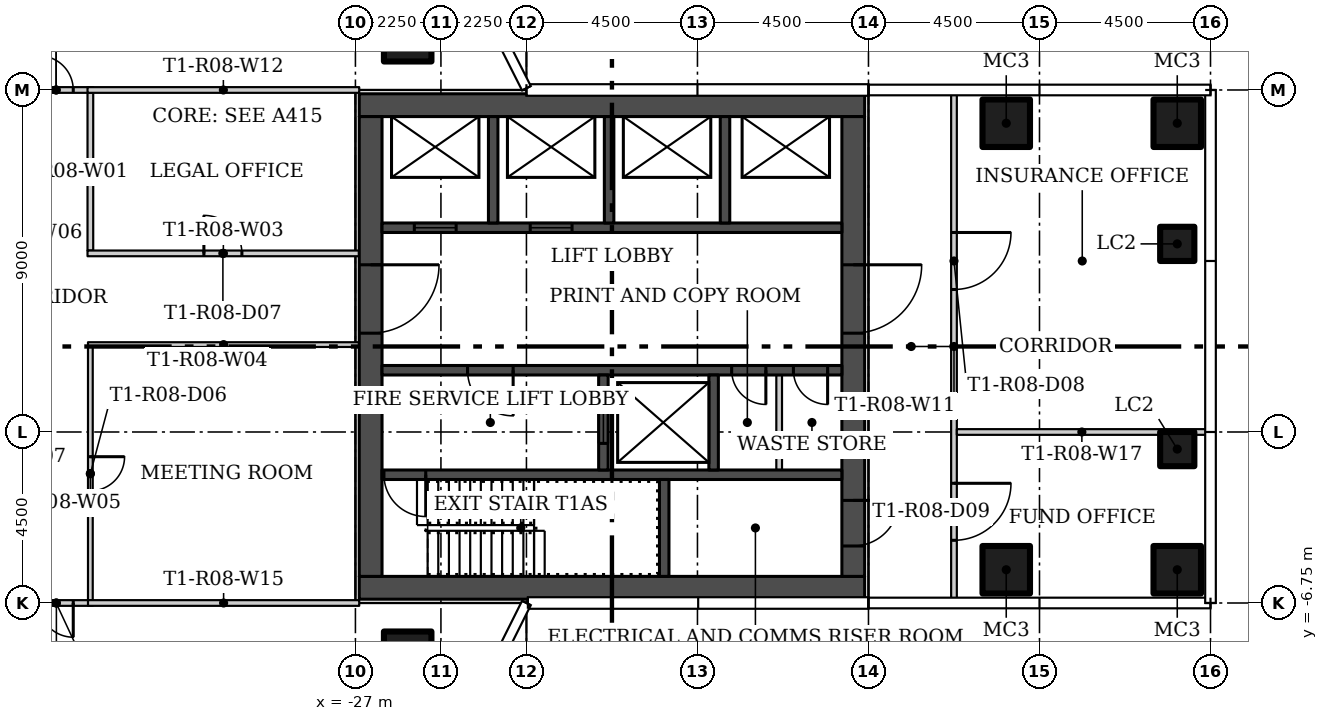
"""IFC4 building model, lengths in metres.
Left out: names, types, materials, properties, quantities, classifications, styles, units other than length and angle.
Written with IfcOpenShell. Run it as: python <this file> out.ifc"""

import sys

from ifc_helpers import new_model, si_unit, direction, frame, frame_2d, origin, origin_2d, place, context, subcontext, project, spatial, rectangle, hollow_rectangle, extrude, element, fill, save


model = new_model("IFC4")
c1 = context("Model", 3, precision=1e-05, world=origin(), true_north=direction((0.0, 1.0)))
c2 = subcontext(c1, "Body", "Model", "MODEL_VIEW")
j1 = project(units=[si_unit("LENGTHUNIT", "METRE"), si_unit("PLANEANGLEUNIT", "RADIAN")], contexts=[c1])
p1 = place(None, origin())
s1 = spatial("IfcSite", under=j1, at=p1, CompositionType="ELEMENT")
p2 = place(p1, origin())
s2 = spatial("IfcBuilding", under=s1, at=p2, CompositionType="ELEMENT")
p3 = place(p2, frame((0.0, 0.0, 85.8)))
s3 = spatial("IfcBuildingStorey", under=s2, at=p3, CompositionType="ELEMENT", Elevation=85.8)
for number, where in (
    (1, (-25.625, 8.125, 0.0)),
    (2, (-25.625, -8.125, 0.0)),
    (3, (-9.875, -5.875, 0.0)),
    (4, (-5.375, -5.875, 0.0)),
    (5, (-9.875, 5.875, 0.0)),
    (6, (-5.375, 5.875, 0.0)),
):
    element("IfcColumn", number, at=place(p3, frame(where)), inside=s3, PredefinedType="COLUMN", context=c2, shape_type="SweptSolid", body=[
        extrude(hollow_rectangle(XDim=1.25, YDim=1.25, WallThickness=0.05, at=origin_2d()), origin(), (0.0, 0.0, 1.0), 3.55),
    ])
for number, where in (
    (7, (-5.375, -2.7, 0.0)),
    (8, (-5.375, 2.7, 0.0)),
):
    element("IfcColumn", number, at=place(p3, frame(where)), inside=s3, PredefinedType="COLUMN", context=c2, shape_type="SweptSolid", body=[
        extrude(hollow_rectangle(XDim=0.9, YDim=0.9, WallThickness=0.036, at=origin_2d()), origin(), (0.0, 0.0, 1.0), 3.55),
    ])
p4 = place(p3, frame((-33.975, 6.675, 0.0), z_axis=(0.0, 0.0, 1.0), x_axis=(0.0, -1.0, 0.0)))
e9 = element("IfcWall", 9, at=p4, inside=s3, PredefinedType="PARTITIONING", context=c2, shape_type="SweptSolid", body=[
    extrude(rectangle(XDim=4.15, YDim=0.15, at=frame_2d((2.075, 0.0))), origin(), (0.0, 0.0, 1.0), 3.55),
])
p5 = place(p3, frame((-34.05, 2.45, 0.0)))
e10 = element("IfcWall", 10, at=p5, inside=s3, PredefinedType="PARTITIONING", context=c2, shape_type="SweptSolid", body=[
    extrude(rectangle(XDim=7.15, YDim=0.15, at=frame_2d((3.575, 0.0))), origin(), (0.0, 0.0, 1.0), 3.55),
])
p6 = place(p5, frame((3.062, 0.0, 0.0)))
e11 = element("IfcOpeningElement", 11, at=p6, cuts=e10, PredefinedType="OPENING", context=c2, shape_type="SweptSolid", body=[
    extrude(rectangle(XDim=1.0, YDim=2.4, at=frame_2d((0.5, 1.2))), frame((0.0, 0.085, 0.0), z_axis=(0.0, -1.0, 0.0), x_axis=(1.0, 0.0, 0.0)), (0.0, 0.0, 1.0), 0.17),
])
p7 = place(p3, frame((-26.9, 0.05, 0.0), z_axis=(0.0, 0.0, 1.0), x_axis=(-1.0, 0.0, 0.0)))
e12 = element("IfcWall", 12, at=p7, inside=s3, PredefinedType="PARTITIONING", context=c2, shape_type="SweptSolid", body=[
    extrude(rectangle(XDim=7.137, YDim=0.125, at=frame_2d((3.569, 0.0))), origin(), (0.0, 0.0, 1.0), 3.55),
])
p8 = place(p3, frame((-33.975, -0.013, 0.0), z_axis=(0.0, 0.0, 1.0), x_axis=(0.0, -1.0, 0.0)))
e13 = element("IfcWall", 13, at=p8, inside=s3, PredefinedType="PARTITIONING", context=c2, shape_type="SweptSolid", body=[
    extrude(rectangle(XDim=6.662, YDim=0.125, at=frame_2d((3.331, 0.0))), origin(), (0.0, 0.0, 1.0), 3.55),
])
p9 = place(p8, frame((2.887, 0.0, 0.0)))
e14 = element("IfcOpeningElement", 14, at=p9, cuts=e13, PredefinedType="OPENING", context=c2, shape_type="SweptSolid", body=[
    extrude(rectangle(XDim=0.9, YDim=2.1, at=frame_2d((0.45, 1.05))), frame((0.0, 0.073, 0.0), z_axis=(0.0, -1.0, 0.0), x_axis=(1.0, 0.0, 0.0)), (0.0, 0.0, 1.0), 0.145),
])
p10 = place(p3, frame((-35.85, 6.75, 0.0)))
e15 = element("IfcWall", 15, at=p10, inside=s3, PredefinedType="PARTITIONING", context=c2, shape_type="SweptSolid", body=[
    extrude(rectangle(XDim=1.951, YDim=0.15, at=frame_2d((0.975, 0.0))), origin(), (0.0, 0.0, 1.0), 3.55),
])
p11 = place(p10, frame((0.525, 0.0, 0.0)))
e16 = element("IfcOpeningElement", 16, at=p11, cuts=e15, PredefinedType="OPENING", context=c2, shape_type="SweptSolid", body=[
    extrude(rectangle(XDim=0.9, YDim=2.1, at=frame_2d((0.45, 1.05))), frame((0.0, 0.085, 0.0), z_axis=(0.0, -1.0, 0.0), x_axis=(1.0, 0.0, 0.0)), (0.0, 0.0, 1.0), 0.17),
])
p12 = place(p3, frame((-33.912, -6.75, 0.0), z_axis=(0.0, 0.0, 1.0), x_axis=(-1.0, 0.0, 0.0)))
e17 = element("IfcWall", 17, at=p12, inside=s3, PredefinedType="PARTITIONING", context=c2, shape_type="SweptSolid", body=[
    extrude(rectangle(XDim=1.913, YDim=0.15, at=frame_2d((0.957, 0.0))), origin(), (0.0, 0.0, 1.0), 3.55),
])
p13 = place(p12, frame((0.513, 0.0, 0.0)))
e18 = element("IfcOpeningElement", 18, at=p13, cuts=e17, PredefinedType="OPENING", context=c2, shape_type="SweptSolid", body=[
    extrude(rectangle(XDim=0.9, YDim=2.1, at=frame_2d((0.45, 1.05))), frame((0.0, 0.085, 0.0), z_axis=(0.0, -1.0, 0.0), x_axis=(1.0, 0.0, 0.0)), (0.0, 0.0, 1.0), 0.17),
])
p14 = place(p3, frame((-11.25, 6.655, 0.0), z_axis=(0.0, 0.0, 1.0), x_axis=(0.0, -1.0, 0.0)))
e19 = element("IfcWall", 19, at=p14, inside=s3, PredefinedType="PARTITIONING", context=c2, shape_type="SweptSolid", body=[
    extrude(rectangle(XDim=13.31, YDim=0.15, at=frame_2d((6.655, 0.0))), origin(), (0.0, 0.0, 1.0), 3.55),
])
p15 = place(p14, frame((3.655, 0.0, 0.0)))
e20 = element("IfcOpeningElement", 20, at=p15, cuts=e19, PredefinedType="OPENING", context=c2, shape_type="SweptSolid", body=[
    extrude(rectangle(XDim=1.5, YDim=2.1, at=frame_2d((0.75, 1.05))), frame((0.0, 0.085, 0.0), z_axis=(0.0, -1.0, 0.0), x_axis=(1.0, 0.0, 0.0)), (0.0, 0.0, 1.0), 0.17),
])
p16 = place(p14, frame((10.255, 0.0, 0.0)))
e21 = element("IfcOpeningElement", 21, at=p16, cuts=e19, PredefinedType="OPENING", context=c2, shape_type="SweptSolid", body=[
    extrude(rectangle(XDim=1.5, YDim=2.1, at=frame_2d((0.75, 1.05))), frame((0.0, 0.085, 0.0), z_axis=(0.0, -1.0, 0.0), x_axis=(1.0, 0.0, 0.0)), (0.0, 0.0, 1.0), 0.17),
])
p17 = place(p3, frame((-26.9, 6.75, 0.0), z_axis=(0.0, 0.0, 1.0), x_axis=(-1.0, 0.0, 0.0)))
e22 = element("IfcWall", 22, at=p17, inside=s3, PredefinedType="PARTITIONING", context=c2, shape_type="SweptSolid", body=[
    extrude(rectangle(XDim=7.15, YDim=0.15, at=frame_2d((3.575, 0.0))), origin(), (0.0, 0.0, 1.0), 3.55),
])
p18 = place(p3, frame((-34.037, -6.75, 0.0)))
e23 = element("IfcWall", 23, at=p18, inside=s3, PredefinedType="PARTITIONING", context=c2, shape_type="SweptSolid", body=[
    extrude(rectangle(XDim=7.137, YDim=0.15, at=frame_2d((3.569, 0.0))), origin(), (0.0, 0.0, 1.0), 3.55),
])
p19 = place(p3, frame((-4.595, -2.25, 0.0), z_axis=(0.0, 0.0, 1.0), x_axis=(-1.0, 0.0, 0.0)))
e24 = element("IfcWall", 24, at=p19, inside=s3, PredefinedType="PARTITIONING", context=c2, shape_type="SweptSolid", body=[
    extrude(rectangle(XDim=6.58, YDim=0.15, at=frame_2d((3.29, 0.0))), origin(), (0.0, 0.0, 1.0), 3.55),
])
for number, where in (
    (25, (-26.9, -6.35, 0.0)),
    (26, (-26.9, 6.35, 0.0)),
):
    element("IfcWall", number, at=place(p3, frame(where)), inside=s3, PredefinedType="SHEAR", context=c2, shape_type="SweptSolid", body=[
        extrude(rectangle(XDim=13.3, YDim=0.6, at=frame_2d((6.65, 0.0))), origin(), (0.0, 0.0, 1.0), 3.55),
    ])
p20 = place(p3, frame((-26.6, 6.05, 0.0), z_axis=(0.0, 0.0, 1.0), x_axis=(0.0, -1.0, 0.0)))
e27 = element("IfcWall", 27, at=p20, inside=s3, PredefinedType="SHEAR", context=c2, shape_type="SweptSolid", body=[
    extrude(rectangle(XDim=12.1, YDim=0.6, at=frame_2d((6.05, 0.0))), origin(), (0.0, 0.0, 1.0), 3.55),
])
p21 = place(p20, frame((3.9, 0.0, 0.0)))
e28 = element("IfcOpeningElement", 28, at=p21, cuts=e27, PredefinedType="OPENING", context=c2, shape_type="SweptSolid", body=[
    extrude(rectangle(XDim=1.8, YDim=2.4, at=frame_2d((0.9, 1.2))), frame((0.0, 0.31, 0.0), z_axis=(0.0, -1.0, 0.0), x_axis=(1.0, 0.0, 0.0)), (0.0, 0.0, 1.0), 0.62),
])
p22 = place(p3, frame((-13.9, 6.05, 0.0), z_axis=(0.0, 0.0, 1.0), x_axis=(0.0, -1.0, 0.0)))
e29 = element("IfcWall", 29, at=p22, inside=s3, PredefinedType="SHEAR", context=c2, shape_type="SweptSolid", body=[
    extrude(rectangle(XDim=12.1, YDim=0.6, at=frame_2d((6.05, 0.0))), origin(), (0.0, 0.0, 1.0), 3.55),
])
p23 = place(p22, frame((10.1, 0.0, 0.0)))
e30 = element("IfcOpeningElement", 30, at=p23, cuts=e29, PredefinedType="OPENING", context=c2, shape_type="SweptSolid", body=[
    extrude(rectangle(XDim=1.2, YDim=2.1, at=frame_2d((0.6, 1.05))), frame((0.0, 0.31, 0.0), z_axis=(0.0, -1.0, 0.0), x_axis=(1.0, 0.0, 0.0)), (0.0, 0.0, 1.0), 0.62),
])
p24 = place(p22, frame((3.9, 0.0, 0.0)))
e31 = element("IfcOpeningElement", 31, at=p24, cuts=e29, PredefinedType="OPENING", context=c2, shape_type="SweptSolid", body=[
    extrude(rectangle(XDim=1.8, YDim=2.4, at=frame_2d((0.9, 1.2))), frame((0.0, 0.31, 0.0), z_axis=(0.0, -1.0, 0.0), x_axis=(1.0, 0.0, 0.0)), (0.0, 0.0, 1.0), 0.62),
])
p25 = place(p3, frame((-14.2, -3.375, 0.0), z_axis=(0.0, 0.0, 1.0), x_axis=(-1.0, 0.0, 0.0)))
e32 = element("IfcWall", 32, at=p25, inside=s3, PredefinedType="SHEAR", context=c2, shape_type="SweptSolid", body=[
    extrude(rectangle(XDim=12.1, YDim=0.25, at=frame_2d((6.05, 0.0))), origin(), (0.0, 0.0, 1.0), 3.55),
])
p26 = place(p25, frame((10.95, 0.0, 0.0)))
e33 = element("IfcOpeningElement", 33, at=p26, cuts=e32, PredefinedType="OPENING", context=c2, shape_type="SweptSolid", body=[
    extrude(rectangle(XDim=1.1, YDim=2.1, at=frame_2d((0.55, 1.05))), frame((0.0, 0.135, 0.0), z_axis=(0.0, -1.0, 0.0), x_axis=(1.0, 0.0, 0.0)), (0.0, 0.0, 1.0), 0.27),
])
p27 = place(p3, frame((-18.875, -6.05, 0.0), z_axis=(0.0, 0.0, 1.0), x_axis=(0.0, 1.0, 0.0)))
e34 = element("IfcWall", 34, at=p27, inside=s3, PredefinedType="SHEAR", context=c2, shape_type="SweptSolid", body=[
    extrude(rectangle(XDim=2.55, YDim=0.25, at=frame_2d((1.275, 0.0))), origin(), (0.0, 0.0, 1.0), 3.55),
])
p28 = place(p3, frame((-14.2, -0.625, 0.0), z_axis=(0.0, 0.0, 1.0), x_axis=(-1.0, 0.0, 0.0)))
e35 = element("IfcWall", 35, at=p28, inside=s3, PredefinedType="SHEAR", context=c2, shape_type="SweptSolid", body=[
    extrude(rectangle(XDim=12.1, YDim=0.25, at=frame_2d((6.05, 0.0))), origin(), (0.0, 0.0, 1.0), 3.55),
])
p29 = place(p28, frame((8.65, 0.0, 0.0)))
e36 = element("IfcOpeningElement", 36, at=p29, cuts=e35, PredefinedType="OPENING", context=c2, shape_type="SweptSolid", body=[
    extrude(rectangle(XDim=1.2, YDim=2.1, at=frame_2d((0.6, 1.05))), frame((0.0, 0.135, 0.0), z_axis=(0.0, -1.0, 0.0), x_axis=(1.0, 0.0, 0.0)), (0.0, 0.0, 1.0), 0.27),
])
p30 = place(p28, frame((2.0, 0.0, 0.0)))
e37 = element("IfcOpeningElement", 37, at=p30, cuts=e35, PredefinedType="OPENING", context=c2, shape_type="SweptSolid", body=[
    extrude(rectangle(XDim=0.9, YDim=2.1, at=frame_2d((0.45, 1.05))), frame((0.0, 0.135, 0.0), z_axis=(0.0, -1.0, 0.0), x_axis=(1.0, 0.0, 0.0)), (0.0, 0.0, 1.0), 0.27),
])
p31 = place(p28, frame((0.375, 0.0, 0.0)))
e38 = element("IfcOpeningElement", 38, at=p31, cuts=e35, PredefinedType="OPENING", context=c2, shape_type="SweptSolid", body=[
    extrude(rectangle(XDim=0.9, YDim=2.1, at=frame_2d((0.45, 1.05))), frame((0.0, 0.135, 0.0), z_axis=(0.0, -1.0, 0.0), x_axis=(1.0, 0.0, 0.0)), (0.0, 0.0, 1.0), 0.27),
])
p32 = place(p3, frame((-20.475, -3.25, 0.0), z_axis=(0.0, 0.0, 1.0), x_axis=(0.0, 1.0, 0.0)))
e39 = element("IfcWall", 39, at=p32, inside=s3, PredefinedType="SHEAR", context=c2, shape_type="SweptSolid", body=[
    extrude(rectangle(XDim=2.5, YDim=0.25, at=frame_2d((1.25, 0.0))), origin(), (0.0, 0.0, 1.0), 3.55),
])
p33 = place(p32, frame((0.7, 0.0, 0.0)))
e40 = element("IfcOpeningElement", 40, at=p33, cuts=e39, PredefinedType="OPENING", context=c2, shape_type="SweptSolid", body=[
    extrude(rectangle(XDim=1.1, YDim=2.1, at=frame_2d((0.55, 1.05))), frame((0.0, 0.135, 0.0), z_axis=(0.0, -1.0, 0.0), x_axis=(1.0, 0.0, 0.0)), (0.0, 0.0, 1.0), 0.27),
])
p34 = place(p3, frame((-17.575, -3.25, 0.0), z_axis=(0.0, 0.0, 1.0), x_axis=(0.0, 1.0, 0.0)))
e41 = element("IfcWall", 41, at=p34, inside=s3, PredefinedType="SHEAR", context=c2, shape_type="SweptSolid", body=[
    extrude(rectangle(XDim=2.5, YDim=0.25, at=frame_2d((1.25, 0.0))), origin(), (0.0, 0.0, 1.0), 3.55),
])
p35 = place(p3, frame((-15.85, -3.25, 0.0), z_axis=(0.0, 0.0, 1.0), x_axis=(0.0, 1.0, 0.0)))
e42 = element("IfcWall", 42, at=p35, inside=s3, PredefinedType="PARTITIONING", context=c2, shape_type="SweptSolid", body=[
    extrude(rectangle(XDim=2.5, YDim=0.15, at=frame_2d((1.25, 0.0))), origin(), (0.0, 0.0, 1.0), 3.55),
])
p36 = place(p3, frame((-26.3, 3.125, 0.0)))
e43 = element("IfcWall", 43, at=p36, inside=s3, PredefinedType="SHEAR", context=c2, shape_type="SweptSolid", body=[
    extrude(rectangle(XDim=12.1, YDim=0.25, at=frame_2d((6.05, 0.0))), origin(), (0.0, 0.0, 1.0), 3.55),
])
p37 = place(p36, frame((0.85, 0.0, 0.0)))
e44 = element("IfcOpeningElement", 44, at=p37, cuts=e43, PredefinedType="OPENING", context=c2, shape_type="SweptSolid", body=[
    extrude(rectangle(XDim=1.1, YDim=2.1, at=frame_2d((0.55, 1.05))), frame((0.0, 0.135, 0.0), z_axis=(0.0, -1.0, 0.0), x_axis=(1.0, 0.0, 0.0)), (0.0, 0.0, 1.0), 0.27),
])
p38 = place(p36, frame((3.9, 0.0, 0.0)))
e45 = element("IfcOpeningElement", 45, at=p38, cuts=e43, PredefinedType="OPENING", context=c2, shape_type="SweptSolid", body=[
    extrude(rectangle(XDim=1.1, YDim=2.1, at=frame_2d((0.55, 1.05))), frame((0.0, 0.135, 0.0), z_axis=(0.0, -1.0, 0.0), x_axis=(1.0, 0.0, 0.0)), (0.0, 0.0, 1.0), 0.27),
])
for number, where, z_axis, x_axis in (
    (46, (-23.375, 3.25, 0.0), (0.0, 0.0, 1.0), (0.0, 1.0, 0.0)),
    (47, (-20.325, 3.25, 0.0), (0.0, 0.0, 1.0), (0.0, 1.0, 0.0)),
    (48, (-17.275, 3.25, 0.0), (0.0, 0.0, 1.0), (0.0, 1.0, 0.0)),
):
    element("IfcWall", number, at=place(p3, frame(where, z_axis=z_axis, x_axis=x_axis)), inside=s3, PredefinedType="SHEAR", context=c2, shape_type="SweptSolid", body=[
        extrude(rectangle(XDim=2.8, YDim=0.25, at=frame_2d((1.4, 0.0))), origin(), (0.0, 0.0, 1.0), 3.55),
    ])
p39 = place(p11, origin())
e49 = element("IfcDoor", 49, at=p39, inside=s3, OperationType="SINGLE_SWING_LEFT", PredefinedType="DOOR", context=c2, shape_type="SweptSolid", body=[
    extrude(rectangle(XDim=0.9, YDim=2.1, at=frame_2d((0.45, 1.05))), frame((0.0, 0.025, 0.0), z_axis=(0.0, -1.0, 0.0), x_axis=(1.0, 0.0, 0.0)), (0.0, 0.0, 1.0), 0.05),
])
fill(e16, e49)
p40 = place(p13, origin())
e50 = element("IfcDoor", 50, at=p40, inside=s3, OperationType="SINGLE_SWING_RIGHT", PredefinedType="DOOR", context=c2, shape_type="SweptSolid", body=[
    extrude(rectangle(XDim=0.9, YDim=2.1, at=frame_2d((0.45, 1.05))), frame((0.0, 0.025, 0.0), z_axis=(0.0, -1.0, 0.0), x_axis=(1.0, 0.0, 0.0)), (0.0, 0.0, 1.0), 0.05),
])
fill(e18, e50)
p41 = place(p9, origin())
e51 = element("IfcDoor", 51, at=p41, inside=s3, OperationType="SINGLE_SWING_RIGHT", PredefinedType="DOOR", context=c2, shape_type="SweptSolid", body=[
    extrude(rectangle(XDim=0.9, YDim=2.1, at=frame_2d((0.45, 1.05))), frame((0.0, 0.025, 0.0), z_axis=(0.0, -1.0, 0.0), x_axis=(1.0, 0.0, 0.0)), (0.0, 0.0, 1.0), 0.05),
])
fill(e14, e51)
p42 = place(p6, origin())
e52 = element("IfcDoor", 52, at=p42, inside=s3, OperationType="SINGLE_SWING_RIGHT", PredefinedType="DOOR", context=c2, shape_type="SweptSolid", body=[
    extrude(rectangle(XDim=1.0, YDim=2.4, at=frame_2d((0.5, 1.2))), frame((0.0, 0.025, 0.0), z_axis=(0.0, -1.0, 0.0), x_axis=(1.0, 0.0, 0.0)), (0.0, 0.0, 1.0), 0.05),
])
fill(e11, e52)
p43 = place(p15, origin())
e53 = element("IfcDoor", 53, at=p43, inside=s3, OperationType="DOUBLE_DOOR_SINGLE_SWING", PredefinedType="DOOR", context=c2, shape_type="SweptSolid", body=[
    extrude(rectangle(XDim=1.5, YDim=2.1, at=frame_2d((0.75, 1.05))), frame((0.0, 0.025, 0.0), z_axis=(0.0, -1.0, 0.0), x_axis=(1.0, 0.0, 0.0)), (0.0, 0.0, 1.0), 0.05),
])
fill(e20, e53)
p44 = place(p16, origin())
e54 = element("IfcDoor", 54, at=p44, inside=s3, OperationType="DOUBLE_DOOR_SINGLE_SWING", PredefinedType="DOOR", context=c2, shape_type="SweptSolid", body=[
    extrude(rectangle(XDim=1.5, YDim=2.1, at=frame_2d((0.75, 1.05))), frame((0.0, 0.025, 0.0), z_axis=(0.0, -1.0, 0.0), x_axis=(1.0, 0.0, 0.0)), (0.0, 0.0, 1.0), 0.05),
])
fill(e21, e54)
p45 = place(p21, origin())
e55 = element("IfcDoor", 55, at=p45, inside=s3, OperationType="DOUBLE_DOOR_SINGLE_SWING", PredefinedType="DOOR", context=c2, shape_type="SweptSolid", body=[
    extrude(rectangle(XDim=1.8, YDim=2.4, at=frame_2d((0.9, 1.2))), frame((0.0, 0.025, 0.0), z_axis=(0.0, -1.0, 0.0), x_axis=(1.0, 0.0, 0.0)), (0.0, 0.0, 1.0), 0.05),
])
fill(e28, e55)
p46 = place(p23, origin())
e56 = element("IfcDoor", 56, at=p46, inside=s3, OperationType="SINGLE_SWING_RIGHT", PredefinedType="DOOR", context=c2, shape_type="SweptSolid", body=[
    extrude(rectangle(XDim=1.2, YDim=2.1, at=frame_2d((0.6, 1.05))), frame((0.0, 0.025, 0.0), z_axis=(0.0, -1.0, 0.0), x_axis=(1.0, 0.0, 0.0)), (0.0, 0.0, 1.0), 0.05),
])
fill(e30, e56)
p47 = place(p24, origin())
e57 = element("IfcDoor", 57, at=p47, inside=s3, OperationType="DOUBLE_DOOR_SINGLE_SWING", PredefinedType="DOOR", context=c2, shape_type="SweptSolid", body=[
    extrude(rectangle(XDim=1.8, YDim=2.4, at=frame_2d((0.9, 1.2))), frame((0.0, 0.025, 0.0), z_axis=(0.0, -1.0, 0.0), x_axis=(1.0, 0.0, 0.0)), (0.0, 0.0, 1.0), 0.05),
])
fill(e31, e57)
p48 = place(p26, origin())
e58 = element("IfcDoor", 58, at=p48, inside=s3, OperationType="SINGLE_SWING_RIGHT", PredefinedType="DOOR", context=c2, shape_type="SweptSolid", body=[
    extrude(rectangle(XDim=1.1, YDim=2.1, at=frame_2d((0.55, 1.05))), frame((0.0, 0.025, 0.0), z_axis=(0.0, -1.0, 0.0), x_axis=(1.0, 0.0, 0.0)), (0.0, 0.0, 1.0), 0.05),
])
fill(e33, e58)
p49 = place(p29, origin())
e59 = element("IfcDoor", 59, at=p49, inside=s3, OperationType="SINGLE_SWING_RIGHT", PredefinedType="DOOR", context=c2, shape_type="SweptSolid", body=[
    extrude(rectangle(XDim=1.2, YDim=2.1, at=frame_2d((0.6, 1.05))), frame((0.0, 0.025, 0.0), z_axis=(0.0, -1.0, 0.0), x_axis=(1.0, 0.0, 0.0)), (0.0, 0.0, 1.0), 0.05),
])
fill(e36, e59)
p50 = place(p30, origin())
e60 = element("IfcDoor", 60, at=p50, inside=s3, OperationType="SINGLE_SWING_LEFT", PredefinedType="DOOR", context=c2, shape_type="SweptSolid", body=[
    extrude(rectangle(XDim=0.9, YDim=2.1, at=frame_2d((0.45, 1.05))), frame((0.0, 0.025, 0.0), z_axis=(0.0, -1.0, 0.0), x_axis=(1.0, 0.0, 0.0)), (0.0, 0.0, 1.0), 0.05),
])
fill(e37, e60)
p51 = place(p31, origin())
e61 = element("IfcDoor", 61, at=p51, inside=s3, OperationType="SINGLE_SWING_LEFT", PredefinedType="DOOR", context=c2, shape_type="SweptSolid", body=[
    extrude(rectangle(XDim=0.9, YDim=2.1, at=frame_2d((0.45, 1.05))), frame((0.0, 0.025, 0.0), z_axis=(0.0, -1.0, 0.0), x_axis=(1.0, 0.0, 0.0)), (0.0, 0.0, 1.0), 0.05),
])
fill(e38, e61)
p52 = place(p33, origin())
e62 = element("IfcDoor", 62, at=p52, inside=s3, OperationType="SLIDING_TO_LEFT", PredefinedType="DOOR", context=c2, shape_type="SweptSolid", body=[
    extrude(rectangle(XDim=1.1, YDim=2.1, at=frame_2d((0.55, 1.05))), frame((0.0, 0.025, 0.0), z_axis=(0.0, -1.0, 0.0), x_axis=(1.0, 0.0, 0.0)), (0.0, 0.0, 1.0), 0.05),
])
fill(e40, e62)
p53 = place(p37, origin())
e63 = element("IfcDoor", 63, at=p53, inside=s3, OperationType="SLIDING_TO_LEFT", PredefinedType="DOOR", context=c2, shape_type="SweptSolid", body=[
    extrude(rectangle(XDim=1.1, YDim=2.1, at=frame_2d((0.55, 1.05))), frame((0.0, 0.025, 0.0), z_axis=(0.0, -1.0, 0.0), x_axis=(1.0, 0.0, 0.0)), (0.0, 0.0, 1.0), 0.05),
])
fill(e44, e63)
p54 = place(p38, origin())
e64 = element("IfcDoor", 64, at=p54, inside=s3, OperationType="SLIDING_TO_LEFT", PredefinedType="DOOR", context=c2, shape_type="SweptSolid", body=[
    extrude(rectangle(XDim=1.1, YDim=2.1, at=frame_2d((0.55, 1.05))), frame((0.0, 0.025, 0.0), z_axis=(0.0, -1.0, 0.0), x_axis=(1.0, 0.0, 0.0)), (0.0, 0.0, 1.0), 0.05),
])
fill(e45, e64)
save(model, sys.argv[1])
